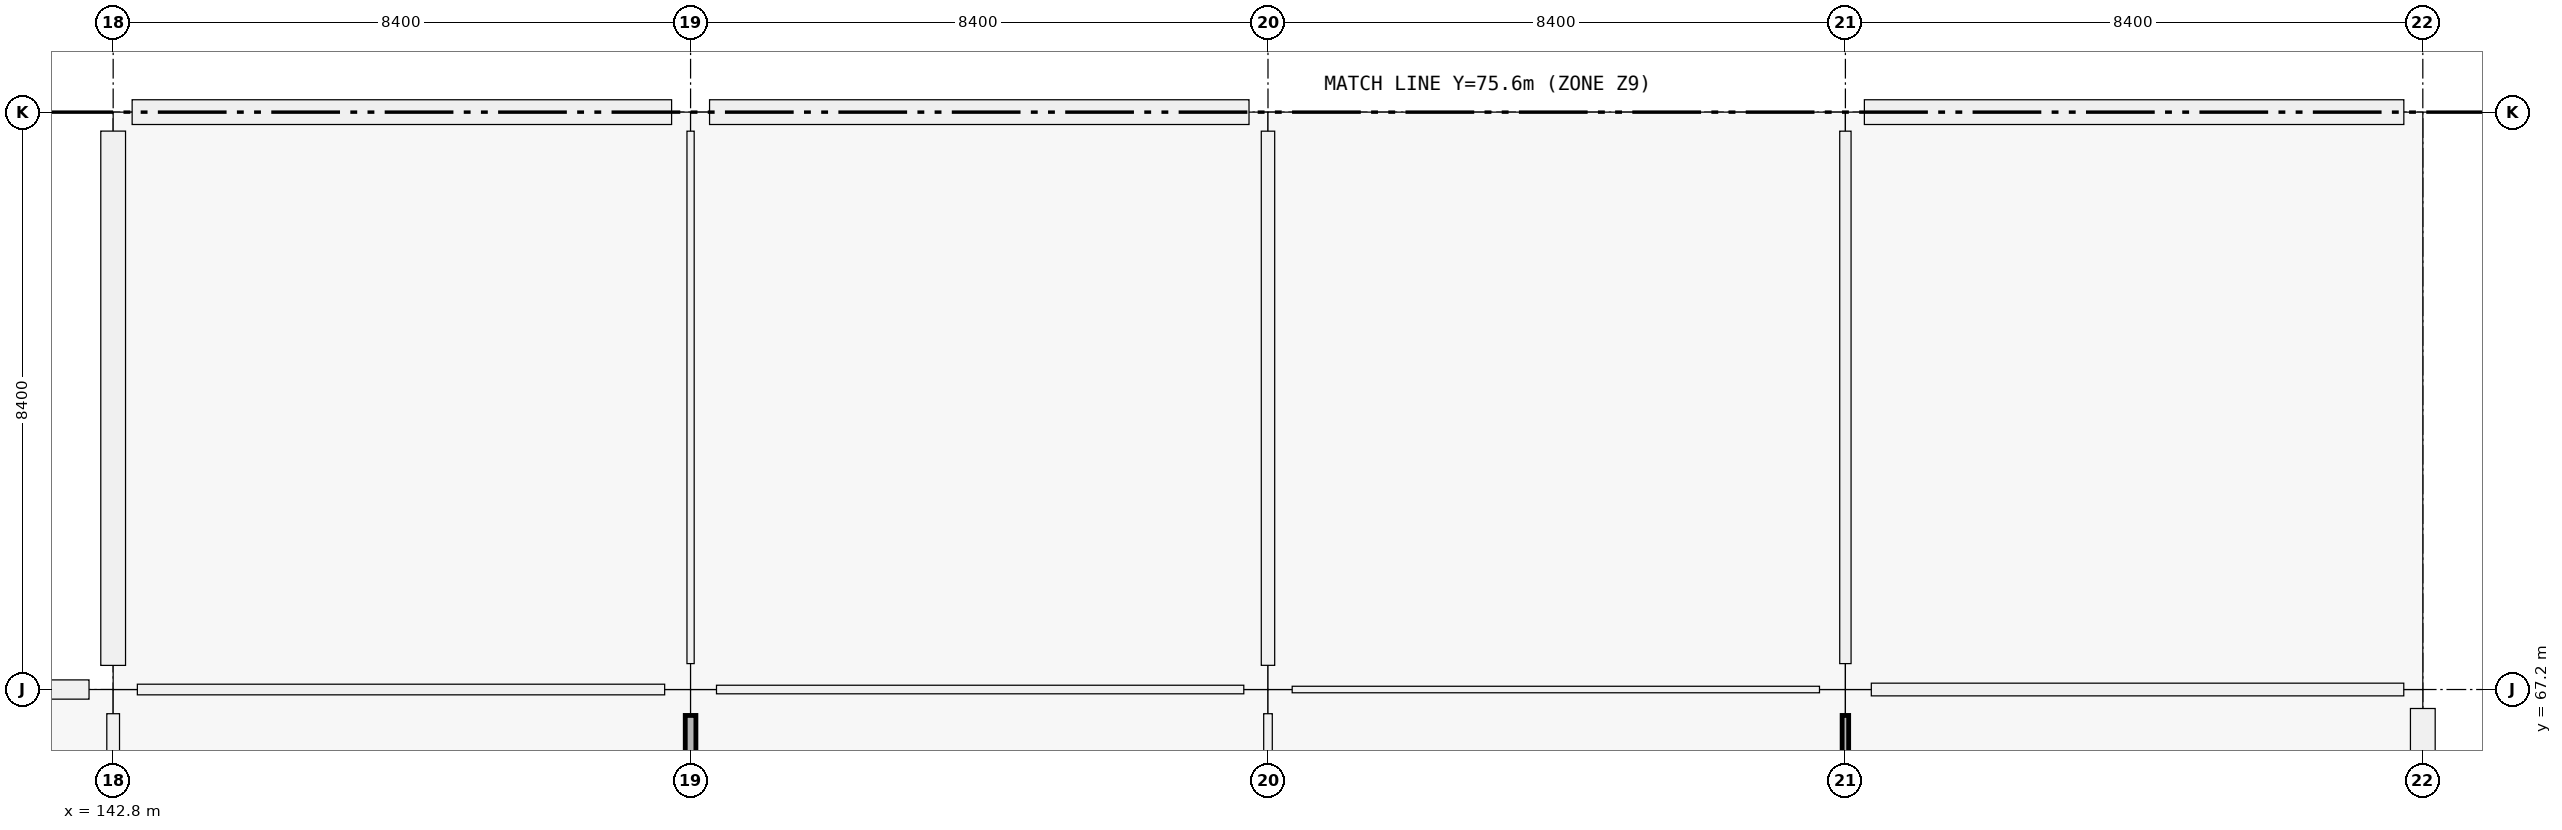
"""IFC4 building model, lengths in metres.
Left out: names, types, materials, properties, quantities, classifications, styles, units other than length and angle.
Written with IfcOpenShell. Run it as: python <this file> out.ifc"""

import sys

from ifc_helpers import new_model, si_unit, direction, frame, frame_2d, origin, origin_2d, place, context, subcontext, project, spatial, rectangle, extrude, element, fill, save


model = new_model("IFC4")
c1 = context("Model", 3, precision=1e-05, world=origin(), true_north=direction((0.0, 1.0)))
c2 = subcontext(c1, "Body", "Model", "MODEL_VIEW")
j1 = project(units=[si_unit("LENGTHUNIT", "METRE"), si_unit("PLANEANGLEUNIT", "RADIAN")], contexts=[c1])
p1 = place(None, origin())
s1 = spatial("IfcSite", under=j1, at=p1, CompositionType="ELEMENT")
p2 = place(p1, origin())
s2 = spatial("IfcBuilding", under=s1, at=p2, CompositionType="ELEMENT")
p3 = place(p2, frame((0.0, 0.0, 5.76)))
s3 = spatial("IfcBuildingStorey", under=s2, at=p3, CompositionType="ELEMENT", Elevation=5.76)
p4 = place(p3, frame((142.8, 67.2, 0.0), z_axis=(0.0, 0.0, 1.0), x_axis=(1.0, 0.0, 0.0)))
e1 = element("IfcColumn", 1, at=p4, inside=s3, PredefinedType="COLUMN", context=c2, shape_type="SweptSolid", body=[
    extrude(rectangle(XDim=0.7, YDim=0.7, at=origin_2d()), origin(), (0.0, 0.0, 1.0), 4.5),
])
p5 = place(p3, frame((142.8, 75.6, 0.0), z_axis=(0.0, 0.0, 1.0), x_axis=(1.0, 0.0, 0.0)))
e2 = element("IfcColumn", 2, at=p5, inside=s3, PredefinedType="COLUMN", context=c2, shape_type="SweptSolid", body=[
    extrude(rectangle(XDim=0.55, YDim=0.55, at=origin_2d()), origin(), (0.0, 0.0, 1.0), 4.2),
])
p6 = place(p3, frame((151.2, 67.2, 0.0), z_axis=(0.0, 0.0, 1.0), x_axis=(1.0, 0.0, 0.0)))
e3 = element("IfcColumn", 3, at=p6, inside=s3, PredefinedType="COLUMN", context=c2, shape_type="SweptSolid", body=[
    extrude(rectangle(XDim=0.75, YDim=0.75, at=origin_2d()), origin(), (0.0, 0.0, 1.0), 4.5),
])
p7 = place(p3, frame((151.2, 75.6, 0.0), z_axis=(0.0, 0.0, 1.0), x_axis=(1.0, 0.0, 0.0)))
e4 = element("IfcColumn", 4, at=p7, inside=s3, PredefinedType="COLUMN", context=c2, shape_type="SweptSolid", body=[
    extrude(rectangle(XDim=0.55, YDim=0.55, at=origin_2d()), origin(), (0.0, 0.0, 1.0), 4.2),
])
p8 = place(p3, frame((159.6, 67.2, 0.0), z_axis=(0.0, 0.0, 1.0), x_axis=(1.0, 0.0, 0.0)))
e5 = element("IfcColumn", 5, at=p8, inside=s3, PredefinedType="COLUMN", context=c2, shape_type="SweptSolid", body=[
    extrude(rectangle(XDim=0.7, YDim=0.7, at=origin_2d()), origin(), (0.0, 0.0, 1.0), 4.5),
])
p9 = place(p3, frame((159.6, 75.6, 0.0), z_axis=(0.0, 0.0, 1.0), x_axis=(1.0, 0.0, 0.0)))
e6 = element("IfcColumn", 6, at=p9, inside=s3, PredefinedType="COLUMN", context=c2, shape_type="SweptSolid", body=[
    extrude(rectangle(XDim=0.55, YDim=0.55, at=origin_2d()), origin(), (0.0, 0.0, 1.0), 4.2),
])
p10 = place(p3, frame((168.0, 67.2, 0.0), z_axis=(0.0, 0.0, 1.0), x_axis=(1.0, 0.0, 0.0)))
e7 = element("IfcColumn", 7, at=p10, inside=s3, PredefinedType="COLUMN", context=c2, shape_type="SweptSolid", body=[
    extrude(rectangle(XDim=0.75, YDim=0.75, at=origin_2d()), origin(), (0.0, 0.0, 1.0), 4.5),
])
for number, where, z_axis, x_axis in (
    (8, (168.0, 75.6, 0.0), (0.0, 0.0, 1.0), (1.0, 0.0, 0.0)),
    (9, (176.4, 67.2, 0.0), (0.0, 0.0, 1.0), (1.0, 0.0, 0.0)),
    (10, (176.4, 75.6, 0.0), (0.0, 0.0, 1.0), (1.0, 0.0, 0.0)),
):
    element("IfcColumn", number, at=place(p3, frame(where, z_axis=z_axis, x_axis=x_axis)), inside=s3, PredefinedType="COLUMN", context=c2, shape_type="SweptSolid", body=[
        extrude(rectangle(XDim=0.55, YDim=0.55, at=origin_2d()), origin(), (0.0, 0.0, 1.0), 4.2),
    ])
p11 = place(p3, frame((134.726, 67.2, 0.0), z_axis=(0.0, 0.0, 1.0), x_axis=(1.0, 0.0, 0.0)))
e11 = element("IfcWall", 11, at=p11, inside=s3, PredefinedType="SOLIDWALL", context=c2, shape_type="SweptSolid", body=[
    extrude(rectangle(XDim=7.723, YDim=0.28, at=frame_2d((3.861, 0.0))), origin(), (0.0, 0.0, 1.0), 3.4),
])
p12 = place(p11, frame((2.662, 0.0, 0.9)))
e12 = element("IfcOpeningElement", 12, at=p12, cuts=e11, PredefinedType="OPENING", context=c2, shape_type="SweptSolid", body=[
    extrude(rectangle(XDim=2.4, YDim=2.25, at=frame_2d((1.2, 1.125))), frame((0.0, 0.14, 0.0), z_axis=(0.0, -1.0, 0.0), x_axis=(1.0, 0.0, 0.0)), (0.0, 0.0, 1.0), 0.28),
])
p13 = place(p3, frame((142.8, 67.551, 0.0), z_axis=(0.0, 0.0, 1.0), x_axis=(0.0, 1.0, 0.0)))
e13 = element("IfcWall", 13, at=p13, inside=s3, PredefinedType="SOLIDWALL", context=c2, shape_type="SweptSolid", body=[
    extrude(rectangle(XDim=7.773, YDim=0.36, at=frame_2d((3.886, 0.0))), origin(), (0.0, 0.0, 1.0), 3.4),
])
p14 = place(p13, frame((3.036, 0.0, 0.9)))
e14 = element("IfcOpeningElement", 14, at=p14, cuts=e13, PredefinedType="OPENING", context=c2, shape_type="SweptSolid", body=[
    extrude(rectangle(XDim=1.7, YDim=1.85, at=frame_2d((0.85, 0.925))), frame((0.0, 0.18, 0.0), z_axis=(0.0, -1.0, 0.0), x_axis=(1.0, 0.0, 0.0)), (0.0, 0.0, 1.0), 0.36),
])
p15 = place(p3, frame((143.076, 75.6, 0.0), z_axis=(0.0, 0.0, 1.0), x_axis=(1.0, 0.0, 0.0)))
e15 = element("IfcWall", 15, at=p15, inside=s3, PredefinedType="SOLIDWALL", context=c2, shape_type="SweptSolid", body=[
    extrude(rectangle(XDim=7.848, YDim=0.36, at=frame_2d((3.924, 0.0))), origin(), (0.0, 0.0, 1.0), 3.4),
])
p16 = place(p15, frame((2.774, 0.0, 0.9)))
e16 = element("IfcOpeningElement", 16, at=p16, cuts=e15, PredefinedType="OPENING", context=c2, shape_type="SweptSolid", body=[
    extrude(rectangle(XDim=2.3, YDim=1.85, at=frame_2d((1.15, 0.925))), frame((0.0, 0.18, 0.0), z_axis=(0.0, -1.0, 0.0), x_axis=(1.0, 0.0, 0.0)), (0.0, 0.0, 1.0), 0.36),
])
p17 = place(p3, frame((151.476, 75.6, 0.0), z_axis=(0.0, 0.0, 1.0), x_axis=(1.0, 0.0, 0.0)))
e17 = element("IfcWall", 17, at=p17, inside=s3, PredefinedType="SOLIDWALL", context=c2, shape_type="SweptSolid", body=[
    extrude(rectangle(XDim=7.848, YDim=0.36, at=frame_2d((3.924, 0.0))), origin(), (0.0, 0.0, 1.0), 3.4),
])
p18 = place(p17, frame((2.474, 0.0, 0.9)))
e18 = element("IfcOpeningElement", 18, at=p18, cuts=e17, PredefinedType="OPENING", context=c2, shape_type="SweptSolid", body=[
    extrude(rectangle(XDim=2.9, YDim=1.85, at=frame_2d((1.45, 0.925))), frame((0.0, 0.18, 0.0), z_axis=(0.0, -1.0, 0.0), x_axis=(1.0, 0.0, 0.0)), (0.0, 0.0, 1.0), 0.36),
])
p19 = place(p3, frame((176.4, 66.924, 0.0), z_axis=(0.0, 0.0, 1.0), x_axis=(0.0, -1.0, 0.0)))
e19 = element("IfcWall", 19, at=p19, inside=s3, PredefinedType="SOLIDWALL", context=c2, shape_type="SweptSolid", body=[
    extrude(rectangle(XDim=7.848, YDim=0.36, at=frame_2d((3.924, 0.0))), origin(), (0.0, 0.0, 1.0), 3.4),
])
p20 = place(p19, frame((2.549, 0.0, 0.9)))
e20 = element("IfcOpeningElement", 20, at=p20, cuts=e19, PredefinedType="OPENING", context=c2, shape_type="SweptSolid", body=[
    extrude(rectangle(XDim=2.75, YDim=1.6, at=frame_2d((1.375, 0.8))), frame((0.0, 0.18, 0.0), z_axis=(0.0, -1.0, 0.0), x_axis=(1.0, 0.0, 0.0)), (0.0, 0.0, 1.0), 0.36),
])
p21 = place(p3, frame((168.276, 75.6, 0.0), z_axis=(0.0, 0.0, 1.0), x_axis=(1.0, 0.0, 0.0)))
e21 = element("IfcWall", 21, at=p21, inside=s3, PredefinedType="SOLIDWALL", context=c2, shape_type="SweptSolid", body=[
    extrude(rectangle(XDim=7.848, YDim=0.36, at=frame_2d((3.924, 0.0))), origin(), (0.0, 0.0, 1.0), 3.4),
])
p22 = place(p21, frame((3.149, 0.0, 0.9)))
e22 = element("IfcOpeningElement", 22, at=p22, cuts=e21, PredefinedType="OPENING", context=c2, shape_type="SweptSolid", body=[
    extrude(rectangle(XDim=1.55, YDim=1.6, at=frame_2d((0.775, 0.8))), frame((0.0, 0.18, 0.0), z_axis=(0.0, -1.0, 0.0), x_axis=(1.0, 0.0, 0.0)), (0.0, 0.0, 1.0), 0.36),
])
p23 = place(p3, frame((143.152, 67.2, 0.0), z_axis=(0.0, 0.0, 1.0), x_axis=(1.0, 0.0, 0.0)))
e23 = element("IfcWall", 23, at=p23, inside=s3, PredefinedType="PARTITIONING", context=c2, shape_type="SweptSolid", body=[
    extrude(rectangle(XDim=7.671, YDim=0.155, at=frame_2d((3.835, 0.0))), origin(), (0.0, 0.0, 1.0), 2.4),
])
p24 = place(p23, frame((3.336, 0.0, 0.0)))
e24 = element("IfcOpeningElement", 24, at=p24, cuts=e23, PredefinedType="OPENING", context=c2, shape_type="SweptSolid", body=[
    extrude(rectangle(XDim=1.0, YDim=2.2, at=frame_2d((0.5, 1.1))), frame((0.0, 0.078, 0.0), z_axis=(0.0, -1.0, 0.0), x_axis=(1.0, 0.0, 0.0)), (0.0, 0.0, 1.0), 0.155),
])
p25 = place(p3, frame((151.577, 67.2, 0.0), z_axis=(0.0, 0.0, 1.0), x_axis=(1.0, 0.0, 0.0)))
e25 = element("IfcWall", 25, at=p25, inside=s3, PredefinedType="PARTITIONING", context=c2, shape_type="SweptSolid", body=[
    extrude(rectangle(XDim=7.671, YDim=0.125, at=frame_2d((3.835, 0.0))), origin(), (0.0, 0.0, 1.0), 2.4),
])
p26 = place(p25, frame((3.311, 0.0, 0.0)))
e26 = element("IfcOpeningElement", 26, at=p26, cuts=e25, PredefinedType="OPENING", context=c2, shape_type="SweptSolid", body=[
    extrude(rectangle(XDim=1.05, YDim=2.12, at=frame_2d((0.525, 1.06))), frame((0.0, 0.062, 0.0), z_axis=(0.0, -1.0, 0.0), x_axis=(1.0, 0.0, 0.0)), (0.0, 0.0, 1.0), 0.125),
])
p27 = place(p3, frame((159.952, 67.2, 0.0), z_axis=(0.0, 0.0, 1.0), x_axis=(1.0, 0.0, 0.0)))
e27 = element("IfcWall", 27, at=p27, inside=s3, PredefinedType="PARTITIONING", context=c2, shape_type="SweptSolid", body=[
    extrude(rectangle(XDim=7.671, YDim=0.095, at=frame_2d((3.835, 0.0))), origin(), (0.0, 0.0, 1.0), 2.4),
])
p28 = place(p27, frame((3.351, 0.0, 0.0)))
e28 = element("IfcOpeningElement", 28, at=p28, cuts=e27, PredefinedType="OPENING", context=c2, shape_type="SweptSolid", body=[
    extrude(rectangle(XDim=0.97, YDim=2.12, at=frame_2d((0.485, 1.06))), frame((0.0, 0.047, 0.0), z_axis=(0.0, -1.0, 0.0), x_axis=(1.0, 0.0, 0.0)), (0.0, 0.0, 1.0), 0.095),
])
p29 = place(p3, frame((168.377, 67.2, 0.0), z_axis=(0.0, 0.0, 1.0), x_axis=(1.0, 0.0, 0.0)))
e29 = element("IfcWall", 29, at=p29, inside=s3, PredefinedType="PARTITIONING", context=c2, shape_type="SweptSolid", body=[
    extrude(rectangle(XDim=7.746, YDim=0.185, at=frame_2d((3.873, 0.0))), origin(), (0.0, 0.0, 1.0), 2.4),
])
p30 = place(p29, frame((3.383, 0.0, 0.0)))
e30 = element("IfcOpeningElement", 30, at=p30, cuts=e29, PredefinedType="OPENING", context=c2, shape_type="SweptSolid", body=[
    extrude(rectangle(XDim=0.98, YDim=2.18, at=frame_2d((0.49, 1.09))), frame((0.0, 0.093, 0.0), z_axis=(0.0, -1.0, 0.0), x_axis=(1.0, 0.0, 0.0)), (0.0, 0.0, 1.0), 0.185),
])
p31 = place(p3, frame((142.8, 59.177, 0.0), z_axis=(0.0, 0.0, 1.0), x_axis=(0.0, 1.0, 0.0)))
e31 = element("IfcWall", 31, at=p31, inside=s3, PredefinedType="PARTITIONING", context=c2, shape_type="SweptSolid", body=[
    extrude(rectangle(XDim=7.671, YDim=0.185, at=frame_2d((3.835, 0.0))), origin(), (0.0, 0.0, 1.0), 2.4),
])
p32 = place(p31, frame((3.376, 0.0, 0.0)))
e32 = element("IfcOpeningElement", 32, at=p32, cuts=e31, PredefinedType="OPENING", context=c2, shape_type="SweptSolid", body=[
    extrude(rectangle(XDim=0.92, YDim=2.15, at=frame_2d((0.46, 1.075))), frame((0.0, 0.093, 0.0), z_axis=(0.0, -1.0, 0.0), x_axis=(1.0, 0.0, 0.0)), (0.0, 0.0, 1.0), 0.185),
])
p33 = place(p3, frame((151.2, 59.152, 0.0), z_axis=(0.0, 0.0, 1.0), x_axis=(0.0, 1.0, 0.0)))
e33 = element("IfcWall", 33, at=p33, inside=s3, PredefinedType="PARTITIONING", context=c2, shape_type="SweptSolid", body=[
    extrude(rectangle(XDim=7.671, YDim=0.155, at=frame_2d((3.835, 0.0))), origin(), (0.0, 0.0, 1.0), 2.4),
])
p34 = place(p33, frame((3.331, 0.0, 0.0)))
e34 = element("IfcOpeningElement", 34, at=p34, cuts=e33, PredefinedType="OPENING", context=c2, shape_type="SweptSolid", body=[
    extrude(rectangle(XDim=1.01, YDim=2.12, at=frame_2d((0.505, 1.06))), frame((0.0, 0.078, 0.0), z_axis=(0.0, -1.0, 0.0), x_axis=(1.0, 0.0, 0.0)), (0.0, 0.0, 1.0), 0.155),
])
p35 = place(p3, frame((151.2, 67.577, 0.0), z_axis=(0.0, 0.0, 1.0), x_axis=(0.0, 1.0, 0.0)))
e35 = element("IfcWall", 35, at=p35, inside=s3, PredefinedType="PARTITIONING", context=c2, shape_type="SweptSolid", body=[
    extrude(rectangle(XDim=7.746, YDim=0.105, at=frame_2d((3.873, 0.0))), origin(), (0.0, 0.0, 1.0), 2.4),
])
p36 = place(p35, frame((3.388, 0.0, 0.0)))
e36 = element("IfcOpeningElement", 36, at=p36, cuts=e35, PredefinedType="OPENING", context=c2, shape_type="SweptSolid", body=[
    extrude(rectangle(XDim=0.97, YDim=2.12, at=frame_2d((0.485, 1.06))), frame((0.0, 0.052, 0.0), z_axis=(0.0, -1.0, 0.0), x_axis=(1.0, 0.0, 0.0)), (0.0, 0.0, 1.0), 0.105),
])
p37 = place(p3, frame((159.6, 59.177, 0.0), z_axis=(0.0, 0.0, 1.0), x_axis=(0.0, 1.0, 0.0)))
e37 = element("IfcWall", 37, at=p37, inside=s3, PredefinedType="PARTITIONING", context=c2, shape_type="SweptSolid", body=[
    extrude(rectangle(XDim=7.671, YDim=0.125, at=frame_2d((3.835, 0.0))), origin(), (0.0, 0.0, 1.0), 2.4),
])
p38 = place(p37, frame((3.331, 0.0, 0.0)))
e38 = element("IfcOpeningElement", 38, at=p38, cuts=e37, PredefinedType="OPENING", context=c2, shape_type="SweptSolid", body=[
    extrude(rectangle(XDim=1.01, YDim=2.12, at=frame_2d((0.505, 1.06))), frame((0.0, 0.062, 0.0), z_axis=(0.0, -1.0, 0.0), x_axis=(1.0, 0.0, 0.0)), (0.0, 0.0, 1.0), 0.125),
])
p39 = place(p3, frame((159.6, 67.552, 0.0), z_axis=(0.0, 0.0, 1.0), x_axis=(0.0, 1.0, 0.0)))
e39 = element("IfcWall", 39, at=p39, inside=s3, PredefinedType="PARTITIONING", context=c2, shape_type="SweptSolid", body=[
    extrude(rectangle(XDim=7.771, YDim=0.195, at=frame_2d((3.885, 0.0))), origin(), (0.0, 0.0, 1.0), 2.4),
])
p40 = place(p39, frame((3.365, 0.0, 0.0)))
e40 = element("IfcOpeningElement", 40, at=p40, cuts=e39, PredefinedType="OPENING", context=c2, shape_type="SweptSolid", body=[
    extrude(rectangle(XDim=1.04, YDim=2.2, at=frame_2d((0.52, 1.1))), frame((0.0, 0.098, 0.0), z_axis=(0.0, -1.0, 0.0), x_axis=(1.0, 0.0, 0.0)), (0.0, 0.0, 1.0), 0.195),
])
p41 = place(p3, frame((168.0, 59.152, 0.0), z_axis=(0.0, 0.0, 1.0), x_axis=(0.0, 1.0, 0.0)))
e41 = element("IfcWall", 41, at=p41, inside=s3, PredefinedType="PARTITIONING", context=c2, shape_type="SweptSolid", body=[
    extrude(rectangle(XDim=7.671, YDim=0.095, at=frame_2d((3.835, 0.0))), origin(), (0.0, 0.0, 1.0), 2.4),
])
p42 = place(p41, frame((3.365, 0.0, 0.0)))
e42 = element("IfcOpeningElement", 42, at=p42, cuts=e41, PredefinedType="OPENING", context=c2, shape_type="SweptSolid", body=[
    extrude(rectangle(XDim=0.94, YDim=2.15, at=frame_2d((0.47, 1.075))), frame((0.0, 0.047, 0.0), z_axis=(0.0, -1.0, 0.0), x_axis=(1.0, 0.0, 0.0)), (0.0, 0.0, 1.0), 0.095),
])
p43 = place(p3, frame((168.0, 67.577, 0.0), z_axis=(0.0, 0.0, 1.0), x_axis=(0.0, 1.0, 0.0)))
e43 = element("IfcWall", 43, at=p43, inside=s3, PredefinedType="PARTITIONING", context=c2, shape_type="SweptSolid", body=[
    extrude(rectangle(XDim=7.746, YDim=0.165, at=frame_2d((3.873, 0.0))), origin(), (0.0, 0.0, 1.0), 2.4),
])
p44 = place(p43, frame((3.413, 0.0, 0.0)))
e44 = element("IfcOpeningElement", 44, at=p44, cuts=e43, PredefinedType="OPENING", context=c2, shape_type="SweptSolid", body=[
    extrude(rectangle(XDim=0.92, YDim=2.15, at=frame_2d((0.46, 1.075))), frame((0.0, 0.083, 0.0), z_axis=(0.0, -1.0, 0.0), x_axis=(1.0, 0.0, 0.0)), (0.0, 0.0, 1.0), 0.165),
])
p45 = place(p14, origin())
e45 = element("IfcWindow", 45, at=p45, inside=s3, PartitioningType="SINGLE_PANEL", PredefinedType="WINDOW", context=c2, shape_type="SweptSolid", body=[
    extrude(rectangle(XDim=1.7, YDim=1.85, at=frame_2d((0.85, 0.925))), frame((0.0, 0.03, 0.0), z_axis=(0.0, -1.0, 0.0), x_axis=(1.0, 0.0, 0.0)), (0.0, 0.0, 1.0), 0.06),
])
fill(e14, e45)
p46 = place(p16, origin())
e46 = element("IfcWindow", 46, at=p46, inside=s3, PartitioningType="SINGLE_PANEL", PredefinedType="WINDOW", context=c2, shape_type="SweptSolid", body=[
    extrude(rectangle(XDim=2.3, YDim=1.85, at=frame_2d((1.15, 0.925))), frame((0.0, 0.03, 0.0), z_axis=(0.0, -1.0, 0.0), x_axis=(1.0, 0.0, 0.0)), (0.0, 0.0, 1.0), 0.06),
])
fill(e16, e46)
p47 = place(p18, origin())
e47 = element("IfcWindow", 47, at=p47, inside=s3, PartitioningType="SINGLE_PANEL", PredefinedType="WINDOW", context=c2, shape_type="SweptSolid", body=[
    extrude(rectangle(XDim=2.9, YDim=1.85, at=frame_2d((1.45, 0.925))), frame((0.0, 0.03, 0.0), z_axis=(0.0, -1.0, 0.0), x_axis=(1.0, 0.0, 0.0)), (0.0, 0.0, 1.0), 0.06),
])
fill(e18, e47)
p48 = place(p22, origin())
e48 = element("IfcWindow", 48, at=p48, inside=s3, PartitioningType="SINGLE_PANEL", PredefinedType="WINDOW", context=c2, shape_type="SweptSolid", body=[
    extrude(rectangle(XDim=1.55, YDim=1.6, at=frame_2d((0.775, 0.8))), frame((0.0, 0.03, 0.0), z_axis=(0.0, -1.0, 0.0), x_axis=(1.0, 0.0, 0.0)), (0.0, 0.0, 1.0), 0.06),
])
fill(e22, e48)
p49 = place(p24, origin())
e49 = element("IfcDoor", 49, at=p49, inside=s3, OperationType="SINGLE_SWING_RIGHT", PredefinedType="DOOR", context=c2, shape_type="SweptSolid", body=[
    extrude(rectangle(XDim=1.0, YDim=2.2, at=frame_2d((0.5, 1.1))), frame((0.0, 0.025, 0.0), z_axis=(0.0, -1.0, 0.0), x_axis=(1.0, 0.0, 0.0)), (0.0, 0.0, 1.0), 0.05),
])
fill(e24, e49)
p50 = place(p26, origin())
e50 = element("IfcDoor", 50, at=p50, inside=s3, OperationType="SINGLE_SWING_LEFT", PredefinedType="DOOR", context=c2, shape_type="SweptSolid", body=[
    extrude(rectangle(XDim=1.05, YDim=2.12, at=frame_2d((0.525, 1.06))), frame((0.0, 0.025, 0.0), z_axis=(0.0, -1.0, 0.0), x_axis=(1.0, 0.0, 0.0)), (0.0, 0.0, 1.0), 0.05),
])
fill(e26, e50)
p51 = place(p28, origin())
e51 = element("IfcDoor", 51, at=p51, inside=s3, OperationType="SINGLE_SWING_LEFT", PredefinedType="DOOR", context=c2, shape_type="SweptSolid", body=[
    extrude(rectangle(XDim=0.97, YDim=2.12, at=frame_2d((0.485, 1.06))), frame((0.0, 0.025, 0.0), z_axis=(0.0, -1.0, 0.0), x_axis=(1.0, 0.0, 0.0)), (0.0, 0.0, 1.0), 0.05),
])
fill(e28, e51)
p52 = place(p30, origin())
e52 = element("IfcDoor", 52, at=p52, inside=s3, OperationType="SINGLE_SWING_RIGHT", PredefinedType="DOOR", context=c2, shape_type="SweptSolid", body=[
    extrude(rectangle(XDim=0.98, YDim=2.18, at=frame_2d((0.49, 1.09))), frame((0.0, 0.025, 0.0), z_axis=(0.0, -1.0, 0.0), x_axis=(1.0, 0.0, 0.0)), (0.0, 0.0, 1.0), 0.05),
])
fill(e30, e52)
p53 = place(p36, origin())
e53 = element("IfcDoor", 53, at=p53, inside=s3, OperationType="SINGLE_SWING_LEFT", PredefinedType="DOOR", context=c2, shape_type="SweptSolid", body=[
    extrude(rectangle(XDim=0.97, YDim=2.12, at=frame_2d((0.485, 1.06))), frame((0.0, 0.025, 0.0), z_axis=(0.0, -1.0, 0.0), x_axis=(1.0, 0.0, 0.0)), (0.0, 0.0, 1.0), 0.05),
])
fill(e36, e53)
p54 = place(p40, origin())
e54 = element("IfcDoor", 54, at=p54, inside=s3, OperationType="SINGLE_SWING_LEFT", PredefinedType="DOOR", context=c2, shape_type="SweptSolid", body=[
    extrude(rectangle(XDim=1.04, YDim=2.2, at=frame_2d((0.52, 1.1))), frame((0.0, 0.025, 0.0), z_axis=(0.0, -1.0, 0.0), x_axis=(1.0, 0.0, 0.0)), (0.0, 0.0, 1.0), 0.05),
])
fill(e40, e54)
p55 = place(p44, origin())
e55 = element("IfcDoor", 55, at=p55, inside=s3, OperationType="SINGLE_SWING_LEFT", PredefinedType="DOOR", context=c2, shape_type="SweptSolid", body=[
    extrude(rectangle(XDim=0.92, YDim=2.15, at=frame_2d((0.46, 1.075))), frame((0.0, 0.025, 0.0), z_axis=(0.0, -1.0, 0.0), x_axis=(1.0, 0.0, 0.0)), (0.0, 0.0, 1.0), 0.05),
])
fill(e44, e55)
save(model, sys.argv[1])
